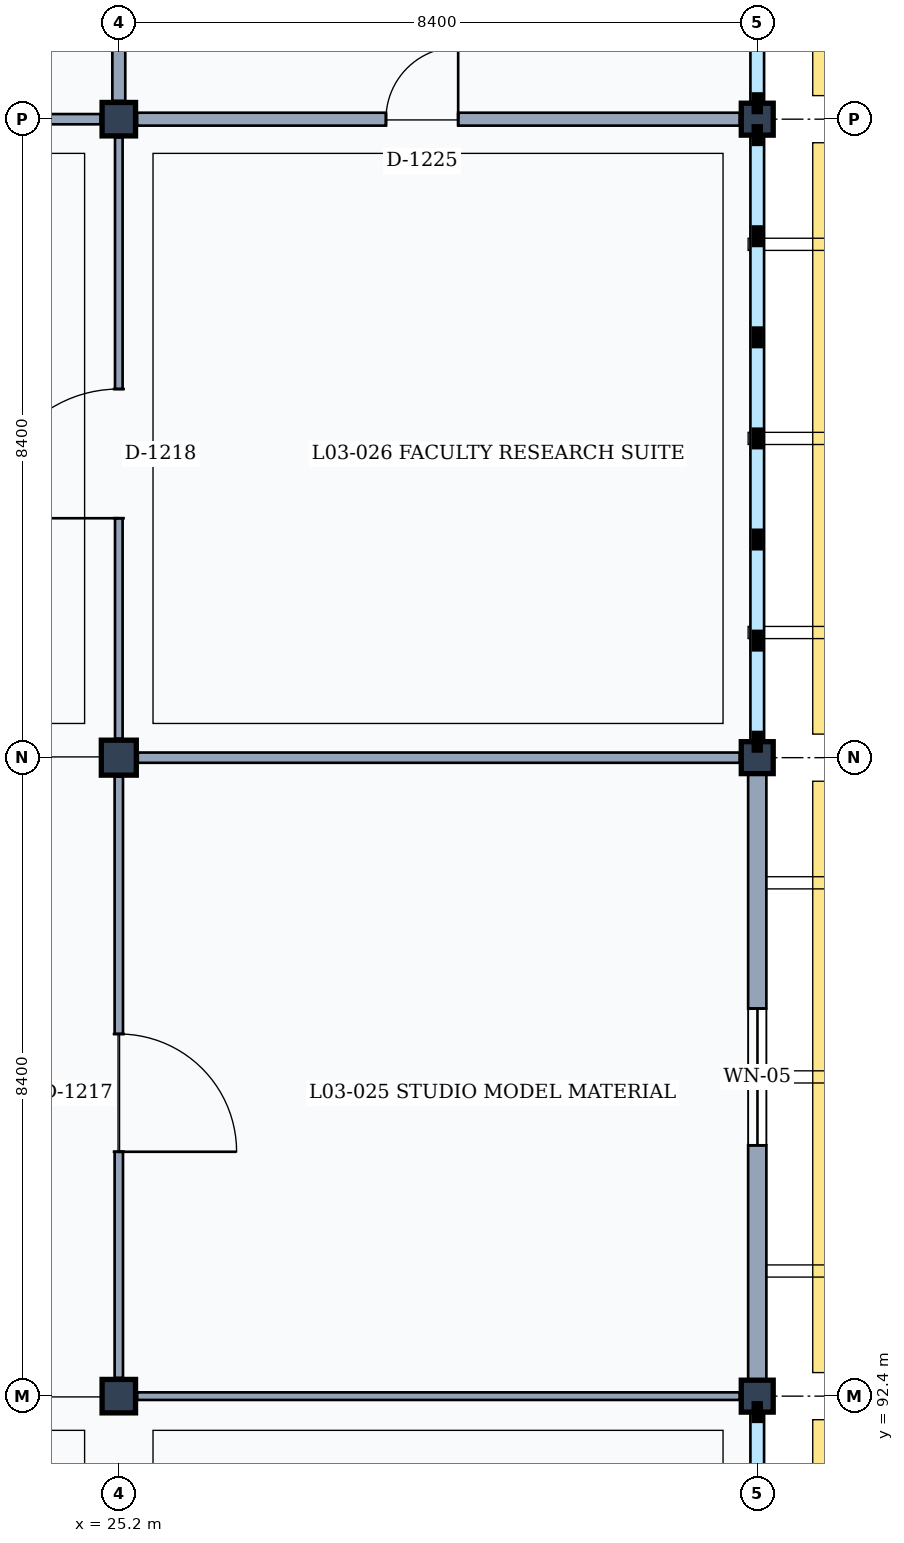
"""IFC4 building model, lengths in metres.
Left out: names, types, materials, properties, quantities, classifications, styles, units other than length and angle.
Written with IfcOpenShell. Run it as: python <this file> out.ifc"""

import sys

from ifc_helpers import new_model, si_unit, direction, frame, frame_2d, origin, origin_2d, place, context, subcontext, project, spatial, rectangle, extrude, element, fill, save


model = new_model("IFC4")
c1 = context("Model", 3, precision=1e-05, world=origin(), true_north=direction((0.0, 1.0)))
c2 = subcontext(c1, "Body", "Model", "MODEL_VIEW")
j1 = project(units=[si_unit("LENGTHUNIT", "METRE"), si_unit("PLANEANGLEUNIT", "RADIAN")], contexts=[c1])
p1 = place(None, origin())
s1 = spatial("IfcSite", under=j1, at=p1, CompositionType="ELEMENT")
p2 = place(p1, origin())
s2 = spatial("IfcBuilding", under=s1, at=p2, CompositionType="ELEMENT")
p3 = place(p2, frame((0.0, 0.0, 13.8)))
s3 = spatial("IfcBuildingStorey", under=s2, at=p3, CompositionType="ELEMENT", Elevation=13.8)
p4 = place(p3, frame((25.2, 92.4, 0.0), z_axis=(0.0, 0.0, 1.0), x_axis=(1.0, 0.0, 0.0)))
e1 = element("IfcColumn", 1, at=p4, inside=s3, PredefinedType="COLUMN", context=c2, shape_type="SweptSolid", body=[
    extrude(rectangle(XDim=0.44, YDim=0.44, at=origin_2d()), origin(), (0.0, 0.0, 1.0), 4.2),
])
p5 = place(p3, frame((25.2, 100.8, 0.0), z_axis=(0.0, 0.0, 1.0), x_axis=(1.0, 0.0, 0.0)))
e2 = element("IfcColumn", 2, at=p5, inside=s3, PredefinedType="COLUMN", context=c2, shape_type="SweptSolid", body=[
    extrude(rectangle(XDim=0.46, YDim=0.46, at=origin_2d()), origin(), (0.0, 0.0, 1.0), 4.2),
])
p6 = place(p3, frame((25.2, 109.2, 0.0), z_axis=(0.0, 0.0, 1.0), x_axis=(1.0, 0.0, 0.0)))
e3 = element("IfcColumn", 3, at=p6, inside=s3, PredefinedType="COLUMN", context=c2, shape_type="SweptSolid", body=[
    extrude(rectangle(XDim=0.44, YDim=0.44, at=origin_2d()), origin(), (0.0, 0.0, 1.0), 4.2),
])
for number, where, z_axis, x_axis in (
    (4, (33.6, 92.4, 0.0), (0.0, 0.0, 1.0), (1.0, 0.0, 0.0)),
    (5, (33.6, 100.8, 0.0), (0.0, 0.0, 1.0), (1.0, 0.0, 0.0)),
    (6, (33.6, 109.2, 0.0), (0.0, 0.0, 1.0), (1.0, 0.0, 0.0)),
):
    element("IfcColumn", number, at=place(p3, frame(where, z_axis=z_axis, x_axis=x_axis)), inside=s3, PredefinedType="COLUMN", context=c2, shape_type="SweptSolid", body=[
        extrude(rectangle(XDim=0.42, YDim=0.42, at=origin_2d()), origin(), (0.0, 0.0, 1.0), 4.2),
    ])
p7 = place(p3, frame((33.6, 100.59, 0.0), z_axis=(0.0, 0.0, 1.0), x_axis=(0.0, -1.0, 0.0)))
e7 = element("IfcWall", 7, at=p7, inside=s3, PredefinedType="SOLIDWALL", context=c2, shape_type="SweptSolid", body=[
    extrude(rectangle(XDim=7.98, YDim=0.24, at=frame_2d((3.99, 0.0))), origin(), (0.0, 0.0, 1.0), 3.36),
])
p8 = place(p7, frame((3.09, 0.0, 0.9)))
e8 = element("IfcOpeningElement", 8, at=p8, cuts=e7, PredefinedType="OPENING", context=c2, shape_type="SweptSolid", body=[
    extrude(rectangle(XDim=1.8, YDim=1.5, at=frame_2d((0.9, 0.75))), frame((0.0, 0.13, 0.0), z_axis=(0.0, -1.0, 0.0), x_axis=(1.0, 0.0, 0.0)), (0.0, 0.0, 1.0), 0.26),
])
p9 = place(p3, frame((25.2, 92.64, 0.0), z_axis=(0.0, 0.0, 1.0), x_axis=(0.0, 1.0, 0.0)))
e9 = element("IfcWall", 9, at=p9, inside=s3, PredefinedType="PARTITIONING", context=c2, shape_type="SweptSolid", body=[
    extrude(rectangle(XDim=7.91, YDim=0.11, at=frame_2d((3.955, 0.0))), origin(), (0.0, 0.0, 1.0), 3.32),
])
p10 = place(p9, frame((2.975, 0.0, 0.0)))
e10 = element("IfcOpeningElement", 10, at=p10, cuts=e9, PredefinedType="OPENING", context=c2, shape_type="SweptSolid", body=[
    extrude(rectangle(XDim=1.55, YDim=2.35, at=frame_2d((0.775, 1.175))), frame((0.0, 0.065, 0.0), z_axis=(0.0, -1.0, 0.0), x_axis=(1.0, 0.0, 0.0)), (0.0, 0.0, 1.0), 0.13),
])
p11 = place(p3, frame((25.2, 101.05, 0.0), z_axis=(0.0, 0.0, 1.0), x_axis=(0.0, 1.0, 0.0)))
e11 = element("IfcWall", 11, at=p11, inside=s3, PredefinedType="MOVABLE", context=c2, shape_type="SweptSolid", body=[
    extrude(rectangle(XDim=7.91, YDim=0.1, at=frame_2d((3.955, 0.0))), origin(), (0.0, 0.0, 1.0), 3.32),
])
p12 = place(p11, frame((2.9, 0.0, 0.0)))
e12 = element("IfcOpeningElement", 12, at=p12, cuts=e11, PredefinedType="OPENING", context=c2, shape_type="SweptSolid", body=[
    extrude(rectangle(XDim=1.7, YDim=2.3, at=frame_2d((0.85, 1.15))), frame((0.0, 0.06, 0.0), z_axis=(0.0, -1.0, 0.0), x_axis=(1.0, 0.0, 0.0)), (0.0, 0.0, 1.0), 0.12),
])
p13 = place(p3, frame((17.04, 109.2, 0.0), z_axis=(0.0, 0.0, 1.0), x_axis=(1.0, 0.0, 0.0)))
e13 = element("IfcWall", 13, at=p13, inside=s3, PredefinedType="PARTITIONING", context=c2, shape_type="SweptSolid", body=[
    extrude(rectangle(XDim=7.92, YDim=0.135, at=frame_2d((3.96, 0.0))), origin(), (0.0, 0.0, 1.0), 3.32),
])
p14 = place(p13, frame((2.8, 0.0, 0.0)))
e14 = element("IfcOpeningElement", 14, at=p14, cuts=e13, PredefinedType="OPENING", context=c2, shape_type="SweptSolid", body=[
    extrude(rectangle(XDim=1.9, YDim=2.4, at=frame_2d((0.95, 1.2))), frame((0.0, 0.077, 0.0), z_axis=(0.0, -1.0, 0.0), x_axis=(1.0, 0.0, 0.0)), (0.0, 0.0, 1.0), 0.155),
])
p15 = place(p3, frame((25.2, 109.44, 0.0), z_axis=(0.0, 0.0, 1.0), x_axis=(0.0, 1.0, 0.0)))
e15 = element("IfcWall", 15, at=p15, inside=s3, PredefinedType="PARTITIONING", context=c2, shape_type="SweptSolid", body=[
    extrude(rectangle(XDim=7.91, YDim=0.17, at=frame_2d((3.955, 0.0))), origin(), (0.0, 0.0, 1.0), 3.32),
])
p16 = place(p3, frame((25.44, 92.4, 0.0), z_axis=(0.0, 0.0, 1.0), x_axis=(1.0, 0.0, 0.0)))
e16 = element("IfcWall", 16, at=p16, inside=s3, PredefinedType="MOVABLE", context=c2, shape_type="SweptSolid", body=[
    extrude(rectangle(XDim=7.93, YDim=0.1, at=frame_2d((3.965, 0.0))), origin(), (0.0, 0.0, 1.0), 3.32),
])
p17 = place(p3, frame((25.45, 100.8, 0.0), z_axis=(0.0, 0.0, 1.0), x_axis=(1.0, 0.0, 0.0)))
e17 = element("IfcWall", 17, at=p17, inside=s3, PredefinedType="PARTITIONING", context=c2, shape_type="SweptSolid", body=[
    extrude(rectangle(XDim=7.92, YDim=0.135, at=frame_2d((3.96, 0.0))), origin(), (0.0, 0.0, 1.0), 3.32),
])
p18 = place(p3, frame((25.44, 109.2, 0.0), z_axis=(0.0, 0.0, 1.0), x_axis=(1.0, 0.0, 0.0)))
e18 = element("IfcWall", 18, at=p18, inside=s3, PredefinedType="PARTITIONING", context=c2, shape_type="SweptSolid", body=[
    extrude(rectangle(XDim=7.93, YDim=0.17, at=frame_2d((3.965, 0.0))), origin(), (0.0, 0.0, 1.0), 3.32),
])
p19 = place(p18, frame((3.275, 0.0, 0.0)))
e19 = element("IfcOpeningElement", 19, at=p19, cuts=e18, PredefinedType="OPENING", context=c2, shape_type="SweptSolid", body=[
    extrude(rectangle(XDim=0.95, YDim=2.15, at=frame_2d((0.475, 1.075))), frame((0.0, 0.095, 0.0), z_axis=(0.0, -1.0, 0.0), x_axis=(1.0, 0.0, 0.0)), (0.0, 0.0, 1.0), 0.19),
])
p20 = place(p8, origin())
e20 = element("IfcWindow", 20, at=p20, inside=s3, PartitioningType="SINGLE_PANEL", PredefinedType="WINDOW", context=c2, shape_type="SweptSolid", body=[
    extrude(rectangle(XDim=1.8, YDim=1.5, at=frame_2d((0.9, 0.75))), frame((0.0, 0.03, 0.0), z_axis=(0.0, -1.0, 0.0), x_axis=(1.0, 0.0, 0.0)), (0.0, 0.0, 1.0), 0.06),
])
fill(e8, e20)
p21 = place(p10, frame((1.55, 0.0, 0.0), z_axis=(0.0, 0.0, 1.0), x_axis=(-1.0, 0.0, 0.0)))
e21 = element("IfcDoor", 21, at=p21, inside=s3, OperationType="SINGLE_SWING_RIGHT", PredefinedType="DOOR", context=c2, shape_type="SweptSolid", body=[
    extrude(rectangle(XDim=1.55, YDim=2.35, at=frame_2d((0.775, 1.175))), frame((0.0, 0.025, 0.0), z_axis=(0.0, -1.0, 0.0), x_axis=(1.0, 0.0, 0.0)), (0.0, 0.0, 1.0), 0.05),
])
fill(e10, e21)
p22 = place(p12, origin())
e22 = element("IfcDoor", 22, at=p22, inside=s3, OperationType="SINGLE_SWING_LEFT", PredefinedType="DOOR", context=c2, shape_type="SweptSolid", body=[
    extrude(rectangle(XDim=1.7, YDim=2.3, at=frame_2d((0.85, 1.15))), frame((0.0, 0.025, 0.0), z_axis=(0.0, -1.0, 0.0), x_axis=(1.0, 0.0, 0.0)), (0.0, 0.0, 1.0), 0.05),
])
fill(e12, e22)
p23 = place(p19, origin())
e23 = element("IfcDoor", 23, at=p23, inside=s3, OperationType="SINGLE_SWING_RIGHT", PredefinedType="DOOR", context=c2, shape_type="SweptSolid", body=[
    extrude(rectangle(XDim=0.95, YDim=2.15, at=frame_2d((0.475, 1.075))), frame((0.0, 0.025, 0.0), z_axis=(0.0, -1.0, 0.0), x_axis=(1.0, 0.0, 0.0)), (0.0, 0.0, 1.0), 0.05),
])
fill(e19, e23)
save(model, sys.argv[1])
